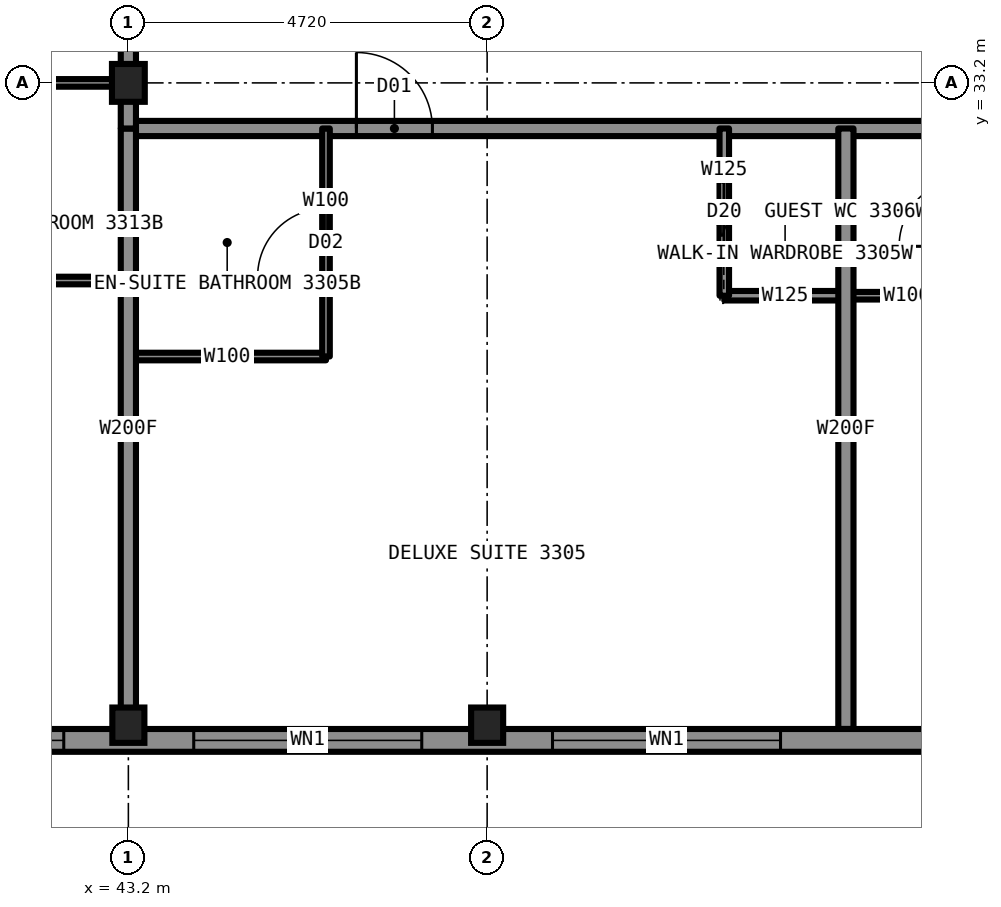
"""IFC4 building model, lengths in metres.
Left out: names, types, materials, properties, quantities, classifications, styles, units other than length and angle.
Written with IfcOpenShell. Run it as: python <this file> out.ifc"""

import sys

from ifc_helpers import new_model, si_unit, direction, frame, frame_2d, origin, origin_2d, place, context, subcontext, project, spatial, rectangle, i_section, extrude, element, fill, save


model = new_model("IFC4")
c1 = context("Model", 3, precision=1e-05, world=origin(), true_north=direction((0.0, 1.0)))
c2 = subcontext(c1, "Body", "Model", "MODEL_VIEW")
j1 = project(units=[si_unit("LENGTHUNIT", "METRE"), si_unit("PLANEANGLEUNIT", "RADIAN")], contexts=[c1])
p1 = place(None, origin())
s1 = spatial("IfcSite", under=j1, at=p1, CompositionType="ELEMENT")
p2 = place(p1, origin())
s2 = spatial("IfcBuilding", under=s1, at=p2, CompositionType="ELEMENT")
p3 = place(p2, frame((0.0, 0.0, 124.9)))
s3 = spatial("IfcBuildingStorey", under=s2, at=p3, CompositionType="ELEMENT", Elevation=124.9)
for number, where, z_axis, x_axis in (
    (1, (43.2, 24.75, 0.0), (0.0, 0.0, 1.0), (1.0, 0.0, 0.0)),
    (2, (47.92, 24.75, 0.0), (0.0, 0.0, 1.0), (1.0, 0.0, 0.0)),
):
    element("IfcColumn", number, at=place(p3, frame(where, z_axis=z_axis, x_axis=x_axis)), inside=s3, PredefinedType="COLUMN", context=c2, shape_type="SweptSolid", body=[
        extrude(i_section(OverallWidth=0.422, OverallDepth=0.465, WebThickness=0.045, FlangeThickness=0.073, at=origin_2d()), origin(), (0.0, 0.0, 1.0), 3.5),
    ])
p4 = place(p3, frame((43.2, 33.2, 0.0), z_axis=(0.0, 0.0, 1.0), x_axis=(1.0, 0.0, 0.0)))
e3 = element("IfcColumn", 3, at=p4, inside=s3, PredefinedType="COLUMN", context=c2, shape_type="SweptSolid", body=[
    extrude(i_section(OverallWidth=0.432, OverallDepth=0.498, WebThickness=0.056, FlangeThickness=0.089, at=origin_2d()), origin(), (0.0, 0.0, 1.0), 3.5),
])
p5 = place(p3, frame((40.6, 33.2, 0.0), z_axis=(0.0, 0.0, 1.0), x_axis=(1.0, 0.0, 0.0)))
e4 = element("IfcWall", 4, at=p5, inside=s3, PredefinedType="PARTITIONING", context=c2, shape_type="SweptSolid", body=[
    extrude(rectangle(XDim=2.6, YDim=0.1, at=frame_2d((1.3, 0.0))), origin(), (0.0, 0.0, 1.0), 2.573),
])
p6 = place(p3, frame((43.2, 32.6, 0.0), z_axis=(0.0, 0.0, 1.0), x_axis=(1.0, 0.0, 0.0)))
e5 = element("IfcWall", 5, at=p6, inside=s3, PredefinedType="PARTITIONING", context=c2, shape_type="SweptSolid", body=[
    extrude(rectangle(XDim=23.6, YDim=0.2, at=frame_2d((11.8, 0.0))), origin(), (0.0, 0.0, 1.0), 3.33),
])
p7 = place(p6, frame((3.0, 0.0, 0.0)))
e6 = element("IfcOpeningElement", 6, at=p7, cuts=e5, PredefinedType="OPENING", context=c2, shape_type="SweptSolid", body=[
    extrude(rectangle(XDim=1.0, YDim=2.2, at=frame_2d((0.5, 1.1))), frame((0.0, 0.11, 0.0), z_axis=(0.0, -1.0, 0.0), x_axis=(1.0, 0.0, 0.0)), (0.0, 0.0, 1.0), 0.22),
])
p8 = place(p6, frame((11.29, 0.0, 0.0)))
e7 = element("IfcOpeningElement", 7, at=p8, cuts=e5, PredefinedType="OPENING", context=c2, shape_type="SweptSolid", body=[
    extrude(rectangle(XDim=1.1, YDim=2.2, at=frame_2d((0.55, 1.1))), frame((0.0, 0.11, 0.0), z_axis=(0.0, -1.0, 0.0), x_axis=(1.0, 0.0, 0.0)), (0.0, 0.0, 1.0), 0.22),
])
p9 = place(p3, frame((40.6, 30.6, 0.0), z_axis=(0.0, 0.0, 1.0), x_axis=(1.0, 0.0, 0.0)))
e8 = element("IfcWall", 8, at=p9, inside=s3, PredefinedType="PARTITIONING", context=c2, shape_type="SweptSolid", body=[
    extrude(rectangle(XDim=2.6, YDim=0.1, at=frame_2d((1.3, 0.0))), origin(), (0.0, 0.0, 1.0), 3.33),
])
p10 = place(p3, frame((52.64, 30.4, 0.0), z_axis=(0.0, 0.0, 1.0), x_axis=(1.0, 0.0, 0.0)))
e9 = element("IfcWall", 9, at=p10, inside=s3, PredefinedType="PARTITIONING", context=c2, shape_type="SweptSolid", body=[
    extrude(rectangle(XDim=1.6, YDim=0.1, at=frame_2d((0.8, 0.0))), origin(), (0.0, 0.0, 1.0), 3.33),
])
p11 = place(p3, frame((51.04, 30.4, 0.0), z_axis=(0.0, 0.0, 1.0), x_axis=(1.0, 0.0, 0.0)))
e10 = element("IfcWall", 10, at=p11, inside=s3, PredefinedType="PARTITIONING", context=c2, shape_type="SweptSolid", body=[
    extrude(rectangle(XDim=1.6, YDim=0.125, at=frame_2d((0.8, 0.0))), origin(), (0.0, 0.0, 1.0), 3.33),
])
p12 = place(p3, frame((43.2, 29.6, 0.0), z_axis=(0.0, 0.0, 1.0), x_axis=(1.0, 0.0, 0.0)))
e11 = element("IfcWall", 11, at=p12, inside=s3, PredefinedType="PARTITIONING", context=c2, shape_type="SweptSolid", body=[
    extrude(rectangle(XDim=2.6, YDim=0.1, at=frame_2d((1.3, 0.0))), origin(), (0.0, 0.0, 1.0), 3.33),
])
p13 = place(p3, frame((43.2, 33.22, 0.0), z_axis=(0.0, 0.0, 1.0), x_axis=(0.0, 1.0, 0.0)))
e12 = element("IfcWall", 12, at=p13, inside=s3, PredefinedType="PARTITIONING", context=c2, shape_type="SweptSolid", body=[
    extrude(rectangle(XDim=23.58, YDim=0.2, at=frame_2d((11.79, 0.0))), origin(), (0.0, 0.0, 1.0), 3.33),
])
p14 = place(p13, frame((6.16, 0.0, 0.0)))
e13 = element("IfcOpeningElement", 13, at=p14, cuts=e12, PredefinedType="OPENING", context=c2, shape_type="SweptSolid", body=[
    extrude(rectangle(XDim=1.0, YDim=2.2, at=frame_2d((0.5, 1.1))), frame((0.0, 0.11, 0.0), z_axis=(0.0, -1.0, 0.0), x_axis=(1.0, 0.0, 0.0)), (0.0, 0.0, 1.0), 0.22),
])
p15 = place(p13, frame((12.42, 0.0, 0.0)))
e14 = element("IfcOpeningElement", 14, at=p15, cuts=e12, PredefinedType="OPENING", context=c2, shape_type="SweptSolid", body=[
    extrude(rectangle(XDim=1.0, YDim=2.2, at=frame_2d((0.5, 1.1))), frame((0.0, 0.11, 0.0), z_axis=(0.0, -1.0, 0.0), x_axis=(1.0, 0.0, 0.0)), (0.0, 0.0, 1.0), 0.22),
])
p16 = place(p13, frame((21.83, 0.0, 0.0)))
e15 = element("IfcOpeningElement", 15, at=p16, cuts=e12, PredefinedType="OPENING", context=c2, shape_type="SweptSolid", body=[
    extrude(rectangle(XDim=1.1, YDim=2.2, at=frame_2d((0.55, 1.1))), frame((0.0, 0.11, 0.0), z_axis=(0.0, -1.0, 0.0), x_axis=(1.0, 0.0, 0.0)), (0.0, 0.0, 1.0), 0.22),
])
p17 = place(p13, frame((0.63, 0.0, 0.0)))
e16 = element("IfcOpeningElement", 16, at=p17, cuts=e12, PredefinedType="OPENING", context=c2, shape_type="SweptSolid", body=[
    extrude(rectangle(XDim=1.1, YDim=2.2, at=frame_2d((0.55, 1.1))), frame((0.0, 0.11, 0.0), z_axis=(0.0, -1.0, 0.0), x_axis=(1.0, 0.0, 0.0)), (0.0, 0.0, 1.0), 0.22),
])
p18 = place(p3, frame((43.2, 24.7, 0.0), z_axis=(0.0, 0.0, 1.0), x_axis=(0.0, 1.0, 0.0)))
e17 = element("IfcWall", 17, at=p18, inside=s3, PredefinedType="PARTITIONING", context=c2, shape_type="SweptSolid", body=[
    extrude(rectangle(XDim=7.9, YDim=0.2, at=frame_2d((3.95, 0.0))), origin(), (0.0, 0.0, 1.0), 2.573),
])
p19 = place(p3, frame((52.64, 24.7, 0.0), z_axis=(0.0, 0.0, 1.0), x_axis=(0.0, 1.0, 0.0)))
e18 = element("IfcWall", 18, at=p19, inside=s3, PredefinedType="PARTITIONING", context=c2, shape_type="SweptSolid", body=[
    extrude(rectangle(XDim=7.9, YDim=0.2, at=frame_2d((3.95, 0.0))), origin(), (0.0, 0.0, 1.0), 3.33),
])
p20 = place(p3, frame((51.04, 30.4, 0.0), z_axis=(0.0, 0.0, 1.0), x_axis=(0.0, 1.0, 0.0)))
e19 = element("IfcWall", 19, at=p20, inside=s3, PredefinedType="PARTITIONING", context=c2, shape_type="SweptSolid", body=[
    extrude(rectangle(XDim=2.2, YDim=0.125, at=frame_2d((1.1, 0.0))), origin(), (0.0, 0.0, 1.0), 3.33),
])
p21 = place(p20, frame((0.7, 0.0, 0.0)))
e20 = element("IfcOpeningElement", 20, at=p21, cuts=e19, PredefinedType="OPENING", context=c2, shape_type="SweptSolid", body=[
    extrude(rectangle(XDim=0.8, YDim=2.1, at=frame_2d((0.4, 1.05))), frame((0.0, 0.073, 0.0), z_axis=(0.0, -1.0, 0.0), x_axis=(1.0, 0.0, 0.0)), (0.0, 0.0, 1.0), 0.145),
])
p22 = place(p3, frame((45.8, 29.6, 0.0), z_axis=(0.0, 0.0, 1.0), x_axis=(0.0, 1.0, 0.0)))
e21 = element("IfcWall", 21, at=p22, inside=s3, PredefinedType="PARTITIONING", context=c2, shape_type="SweptSolid", body=[
    extrude(rectangle(XDim=3.0, YDim=0.1, at=frame_2d((1.5, 0.0))), origin(), (0.0, 0.0, 1.0), 3.33),
])
p23 = place(p22, frame((1.05, 0.0, 0.0)))
e22 = element("IfcOpeningElement", 22, at=p23, cuts=e21, PredefinedType="OPENING", context=c2, shape_type="SweptSolid", body=[
    extrude(rectangle(XDim=0.9, YDim=2.1, at=frame_2d((0.45, 1.05))), frame((0.0, 0.06, 0.0), z_axis=(0.0, -1.0, 0.0), x_axis=(1.0, 0.0, 0.0)), (0.0, 0.0, 1.0), 0.12),
])
p24 = place(p3, frame((39.9, 24.55, 0.0), z_axis=(0.0, 0.0, 1.0), x_axis=(1.0, 0.0, 0.0)))
e23 = element("IfcWall", 23, at=p24, inside=s3, PredefinedType="SOLIDWALL", context=c2, shape_type="SweptSolid", body=[
    extrude(rectangle(XDim=30.2, YDim=0.3, at=frame_2d((15.1, 0.0))), origin(), (0.0, 0.0, 1.0), 2.83),
])
p25 = place(p24, frame((0.85, 0.0, 0.5)))
e24 = element("IfcOpeningElement", 24, at=p25, cuts=e23, PredefinedType="OPENING", context=c2, shape_type="SweptSolid", body=[
    extrude(rectangle(XDim=1.6, YDim=2.0, at=frame_2d((0.8, 1.0))), frame((0.0, 0.16, 0.0), z_axis=(0.0, -1.0, 0.0), x_axis=(1.0, 0.0, 0.0)), (0.0, 0.0, 1.0), 0.32),
])
p26 = place(p24, frame((4.16, 0.0, 0.5)))
e25 = element("IfcOpeningElement", 25, at=p26, cuts=e23, PredefinedType="OPENING", context=c2, shape_type="SweptSolid", body=[
    extrude(rectangle(XDim=3.0, YDim=2.0, at=frame_2d((1.5, 1.0))), frame((0.0, 0.16, 0.0), z_axis=(0.0, -1.0, 0.0), x_axis=(1.0, 0.0, 0.0)), (0.0, 0.0, 1.0), 0.32),
])
p27 = place(p24, frame((8.88, 0.0, 0.5)))
e26 = element("IfcOpeningElement", 26, at=p27, cuts=e23, PredefinedType="OPENING", context=c2, shape_type="SweptSolid", body=[
    extrude(rectangle(XDim=3.0, YDim=2.0, at=frame_2d((1.5, 1.0))), frame((0.0, 0.16, 0.0), z_axis=(0.0, -1.0, 0.0), x_axis=(1.0, 0.0, 0.0)), (0.0, 0.0, 1.0), 0.32),
])
p28 = place(p24, frame((18.32, 0.0, 0.5)))
e27 = element("IfcOpeningElement", 27, at=p28, cuts=e23, PredefinedType="OPENING", context=c2, shape_type="SweptSolid", body=[
    extrude(rectangle(XDim=3.0, YDim=2.0, at=frame_2d((1.5, 1.0))), frame((0.0, 0.16, 0.0), z_axis=(0.0, -1.0, 0.0), x_axis=(1.0, 0.0, 0.0)), (0.0, 0.0, 1.0), 0.32),
])
p29 = place(p24, frame((23.04, 0.0, 0.5)))
e28 = element("IfcOpeningElement", 28, at=p29, cuts=e23, PredefinedType="OPENING", context=c2, shape_type="SweptSolid", body=[
    extrude(rectangle(XDim=3.0, YDim=2.0, at=frame_2d((1.5, 1.0))), frame((0.0, 0.16, 0.0), z_axis=(0.0, -1.0, 0.0), x_axis=(1.0, 0.0, 0.0)), (0.0, 0.0, 1.0), 0.32),
])
p30 = place(p24, frame((27.75, 0.0, 0.5)))
e29 = element("IfcOpeningElement", 29, at=p30, cuts=e23, PredefinedType="OPENING", context=c2, shape_type="SweptSolid", body=[
    extrude(rectangle(XDim=1.6, YDim=2.0, at=frame_2d((0.8, 1.0))), frame((0.0, 0.16, 0.0), z_axis=(0.0, -1.0, 0.0), x_axis=(1.0, 0.0, 0.0)), (0.0, 0.0, 1.0), 0.32),
])
p31 = place(p3, frame((43.2, 32.6, 0.0), z_axis=(0.0, 0.0, 1.0), x_axis=(0.0, 1.0, 0.0)))
e30 = element("IfcWall", 30, at=p31, inside=s3, PredefinedType="PARTITIONING", context=c2, shape_type="SweptSolid", body=[
    extrude(rectangle(XDim=0.62, YDim=0.2, at=frame_2d((0.31, 0.0))), origin(), (0.0, 0.0, 1.0), 2.573),
])
p32 = place(p7, origin())
e31 = element("IfcDoor", 31, at=p32, inside=s3, OperationType="SINGLE_SWING_LEFT", PredefinedType="DOOR", context=c2, shape_type="SweptSolid", body=[
    extrude(rectangle(XDim=1.0, YDim=2.2, at=frame_2d((0.5, 1.1))), frame((0.0, 0.025, 0.0), z_axis=(0.0, -1.0, 0.0), x_axis=(1.0, 0.0, 0.0)), (0.0, 0.0, 1.0), 0.05),
])
fill(e6, e31)
p33 = place(p23, origin())
e32 = element("IfcDoor", 32, at=p33, inside=s3, OperationType="SINGLE_SWING_RIGHT", PredefinedType="DOOR", context=c2, shape_type="SweptSolid", body=[
    extrude(rectangle(XDim=0.9, YDim=2.1, at=frame_2d((0.45, 1.05))), frame((0.0, 0.025, 0.0), z_axis=(0.0, -1.0, 0.0), x_axis=(1.0, 0.0, 0.0)), (0.0, 0.0, 1.0), 0.05),
])
fill(e22, e32)
p34 = place(p21, origin())
e33 = element("IfcDoor", 33, at=p34, inside=s3, OperationType="SLIDING_TO_LEFT", PredefinedType="DOOR", context=c2, shape_type="SweptSolid", body=[
    extrude(rectangle(XDim=0.8, YDim=2.1, at=frame_2d((0.4, 1.05))), frame((0.0, 0.025, 0.0), z_axis=(0.0, -1.0, 0.0), x_axis=(1.0, 0.0, 0.0)), (0.0, 0.0, 1.0), 0.05),
])
fill(e20, e33)
p35 = place(p25, origin())
e34 = element("IfcWindow", 34, at=p35, inside=s3, PartitioningType="SINGLE_PANEL", PredefinedType="WINDOW", context=c2, shape_type="SweptSolid", body=[
    extrude(rectangle(XDim=1.6, YDim=2.0, at=frame_2d((0.8, 1.0))), frame((0.0, 0.03, 0.0), z_axis=(0.0, -1.0, 0.0), x_axis=(1.0, 0.0, 0.0)), (0.0, 0.0, 1.0), 0.06),
])
fill(e24, e34)
p36 = place(p26, origin())
e35 = element("IfcWindow", 35, at=p36, inside=s3, PartitioningType="SINGLE_PANEL", PredefinedType="WINDOW", context=c2, shape_type="SweptSolid", body=[
    extrude(rectangle(XDim=3.0, YDim=2.0, at=frame_2d((1.5, 1.0))), frame((0.0, 0.03, 0.0), z_axis=(0.0, -1.0, 0.0), x_axis=(1.0, 0.0, 0.0)), (0.0, 0.0, 1.0), 0.06),
])
fill(e25, e35)
p37 = place(p27, origin())
e36 = element("IfcWindow", 36, at=p37, inside=s3, PartitioningType="SINGLE_PANEL", PredefinedType="WINDOW", context=c2, shape_type="SweptSolid", body=[
    extrude(rectangle(XDim=3.0, YDim=2.0, at=frame_2d((1.5, 1.0))), frame((0.0, 0.03, 0.0), z_axis=(0.0, -1.0, 0.0), x_axis=(1.0, 0.0, 0.0)), (0.0, 0.0, 1.0), 0.06),
])
fill(e26, e36)
save(model, sys.argv[1])
